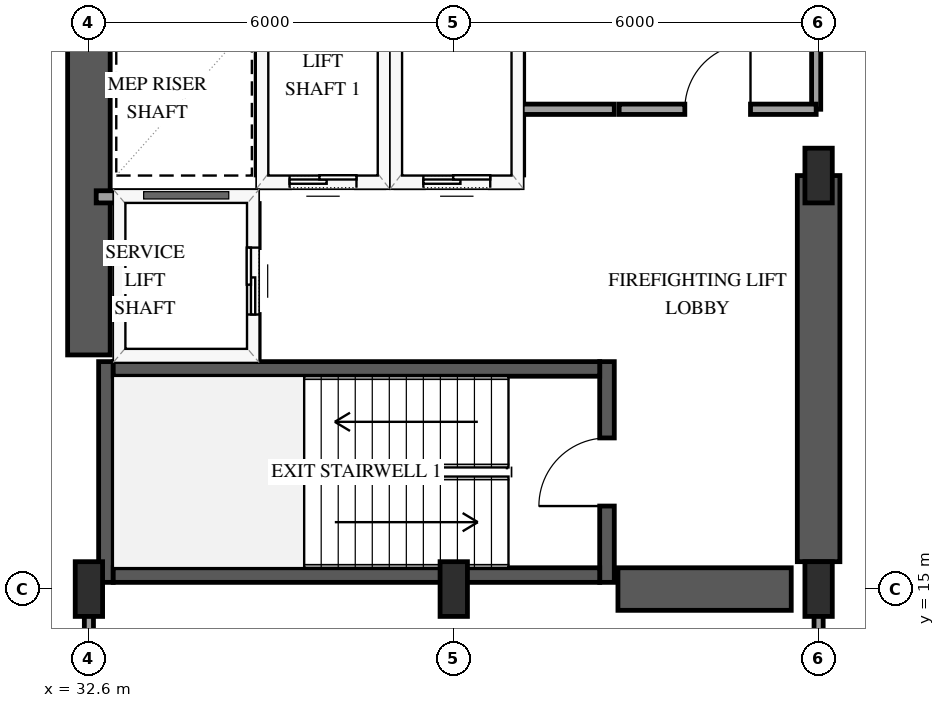
"""IFC4 building model, lengths in metres.
Left out: names, types, materials, properties, quantities, classifications, styles, units other than length and angle.
Written with IfcOpenShell. Run it as: python <this file> out.ifc"""

import sys

from ifc_helpers import new_model, si_unit, direction, frame, frame_2d, origin, origin_2d, place, context, subcontext, project, spatial, rectangle, extrude, element, fill, save


model = new_model("IFC4")
c1 = context("Model", 3, precision=1e-05, world=origin(), true_north=direction((0.0, 1.0)))
c2 = subcontext(c1, "Body", "Model", "MODEL_VIEW")
j1 = project(units=[si_unit("LENGTHUNIT", "METRE"), si_unit("PLANEANGLEUNIT", "RADIAN")], contexts=[c1])
p1 = place(None, origin())
s1 = spatial("IfcSite", under=j1, at=p1, CompositionType="ELEMENT")
p2 = place(p1, origin())
s2 = spatial("IfcBuilding", under=s1, at=p2, CompositionType="ELEMENT")
p3 = place(p2, frame((0.0, 0.0, 16.2)))
s3 = spatial("IfcBuildingStorey", under=s2, at=p3, CompositionType="ELEMENT", Elevation=16.2)
p4 = place(p3, frame((32.88, 15.11, 0.0), z_axis=(0.0, 0.0, 1.0), x_axis=(0.0, 1.0, 0.0)))
e1 = element("IfcWall", 1, at=p4, inside=s3, PredefinedType="SHEAR", context=c2, shape_type="SweptSolid", body=[
    extrude(rectangle(XDim=3.63, YDim=0.24, at=frame_2d((1.815, 0.0))), origin(), (0.0, 0.0, 1.0), 4.5),
])
p5 = place(p3, frame((41.12, 15.11, 0.0), z_axis=(0.0, 0.0, 1.0), x_axis=(0.0, 1.0, 0.0)))
e2 = element("IfcWall", 2, at=p5, inside=s3, PredefinedType="SHEAR", context=c2, shape_type="SweptSolid", body=[
    extrude(rectangle(XDim=3.63, YDim=0.24, at=frame_2d((1.815, 0.0))), origin(), (0.0, 0.0, 1.0), 4.5),
])
p6 = place(p5, frame((1.255, 0.0, 0.0)))
e3 = element("IfcOpeningElement", 3, at=p6, cuts=e2, PredefinedType="OPENING", context=c2, shape_type="SweptSolid", body=[
    extrude(rectangle(XDim=1.12, YDim=2.15, at=frame_2d((0.56, 1.075))), frame((0.0, 0.13, 0.0), z_axis=(0.0, -1.0, 0.0), x_axis=(1.0, 0.0, 0.0)), (0.0, 0.0, 1.0), 0.26),
])
for number, where, z_axis, x_axis in (
    (4, (33.0, 15.23, 0.0), (0.0, 0.0, 1.0), (1.0, 0.0, 0.0)),
    (5, (33.0, 18.62, 0.0), (0.0, 0.0, 1.0), (1.0, 0.0, 0.0)),
):
    element("IfcWall", number, at=place(p3, frame(where, z_axis=z_axis, x_axis=x_axis)), inside=s3, PredefinedType="SHEAR", context=c2, shape_type="SweptSolid", body=[
        extrude(rectangle(XDim=8.0, YDim=0.24, at=frame_2d((4.0, 0.0))), origin(), (0.0, 0.0, 1.0), 4.5),
    ])
p7 = place(p3, frame((32.6, 18.85, 0.0), z_axis=(0.0, 0.0, 1.0), x_axis=(0.0, 1.0, 0.0)))
e6 = element("IfcWall", 6, at=p7, inside=s3, PredefinedType="SHEAR", context=c2, shape_type="SweptSolid", body=[
    extrude(rectangle(XDim=12.3, YDim=0.7, at=frame_2d((6.15, 0.0))), origin(), (0.0, 0.0, 1.0), 4.5),
])
p8 = place(p3, frame((41.3, 15.0, 0.0), z_axis=(0.0, 0.0, 1.0), x_axis=(1.0, 0.0, 0.0)))
e7 = element("IfcWall", 7, at=p8, inside=s3, PredefinedType="SHEAR", context=c2, shape_type="SweptSolid", body=[
    extrude(rectangle(XDim=2.85, YDim=0.7, at=frame_2d((1.425, 0.0))), origin(), (0.0, 0.0, 1.0), 4.5),
])
p9 = place(p3, frame((44.6, 15.45, 0.0), z_axis=(0.0, 0.0, 1.0), x_axis=(0.0, 1.0, 0.0)))
e8 = element("IfcWall", 8, at=p9, inside=s3, PredefinedType="SHEAR", context=c2, shape_type="SweptSolid", body=[
    extrude(rectangle(XDim=6.35, YDim=0.7, at=frame_2d((3.175, 0.0))), origin(), (0.0, 0.0, 1.0), 4.5),
])
for number, where, z_axis, x_axis in (
    (9, (32.6, 15.0, 0.0), (0.0, 0.0, 1.0), (1.0, 0.0, 0.0)),
    (10, (38.6, 15.0, 0.0), (0.0, 0.0, 1.0), (1.0, 0.0, 0.0)),
    (11, (44.6, 15.0, 0.0), (0.0, 0.0, 1.0), (1.0, 0.0, 0.0)),
    (12, (44.6, 21.8, 0.0), (0.0, 0.0, 1.0), (1.0, 0.0, 0.0)),
):
    element("IfcColumn", number, at=place(p3, frame(where, z_axis=z_axis, x_axis=x_axis)), inside=s3, PredefinedType="PILASTER", context=c2, shape_type="SweptSolid", body=[
        extrude(rectangle(XDim=0.45, YDim=0.9, at=origin_2d()), origin(), (0.0, 0.0, 1.0), 4.5),
    ])
p10 = place(p3, frame((35.45, 21.7, 0.0), z_axis=(0.0, 0.0, 1.0), x_axis=(1.0, 0.0, 0.0)))
e13 = element("IfcWall", 13, at=p10, inside=s3, PredefinedType="SOLIDWALL", context=c2, shape_type="SweptSolid", body=[
    extrude(rectangle(XDim=2.0, YDim=0.2, at=frame_2d((1.0, 0.0))), origin(), (0.0, 0.0, 1.0), 4.18),
])
p11 = place(p10, frame((0.45, 0.0, 0.0)))
e14 = element("IfcOpeningElement", 14, at=p11, cuts=e13, PredefinedType="OPENING", context=c2, shape_type="SweptSolid", body=[
    extrude(rectangle(XDim=1.1, YDim=2.15, at=frame_2d((0.55, 1.075))), frame((0.0, 0.11, 0.0), z_axis=(0.0, -1.0, 0.0), x_axis=(1.0, 0.0, 0.0)), (0.0, 0.0, 1.0), 0.22),
])
for number, where, z_axis, x_axis in (
    (15, (35.45, 21.81, 0.0), (0.0, 0.0, 1.0), (0.0, 1.0, 0.0)),
    (16, (37.45, 21.81, 0.0), (0.0, 0.0, 1.0), (0.0, 1.0, 0.0)),
):
    element("IfcWall", number, at=place(p3, frame(where, z_axis=z_axis, x_axis=x_axis)), inside=s3, PredefinedType="SOLIDWALL", context=c2, shape_type="SweptSolid", body=[
        extrude(rectangle(XDim=2.38, YDim=0.2, at=frame_2d((1.19, 0.0))), origin(), (0.0, 0.0, 1.0), 4.18),
    ])
p12 = place(p3, frame((37.65, 21.7, 0.0), z_axis=(0.0, 0.0, 1.0), x_axis=(1.0, 0.0, 0.0)))
e17 = element("IfcWall", 17, at=p12, inside=s3, PredefinedType="SOLIDWALL", context=c2, shape_type="SweptSolid", body=[
    extrude(rectangle(XDim=2.0, YDim=0.2, at=frame_2d((1.0, 0.0))), origin(), (0.0, 0.0, 1.0), 4.18),
])
p13 = place(p12, frame((0.45, 0.0, 0.0)))
e18 = element("IfcOpeningElement", 18, at=p13, cuts=e17, PredefinedType="OPENING", context=c2, shape_type="SweptSolid", body=[
    extrude(rectangle(XDim=1.1, YDim=2.15, at=frame_2d((0.55, 1.075))), frame((0.0, 0.11, 0.0), z_axis=(0.0, -1.0, 0.0), x_axis=(1.0, 0.0, 0.0)), (0.0, 0.0, 1.0), 0.22),
])
p14 = place(p3, frame((39.65, 21.81, 0.0), z_axis=(0.0, 0.0, 1.0), x_axis=(0.0, 1.0, 0.0)))
e19 = element("IfcWall", 19, at=p14, inside=s3, PredefinedType="SOLIDWALL", context=c2, shape_type="SweptSolid", body=[
    extrude(rectangle(XDim=2.38, YDim=0.2, at=frame_2d((1.19, 0.0))), origin(), (0.0, 0.0, 1.0), 4.18),
])
p15 = place(p3, frame((32.72, 21.45, 0.0), z_axis=(0.0, 0.0, 1.0), x_axis=(1.0, 0.0, 0.0)))
e20 = element("IfcWall", 20, at=p15, inside=s3, PredefinedType="SOLIDWALL", context=c2, shape_type="SweptSolid", body=[
    extrude(rectangle(XDim=2.58, YDim=0.2, at=frame_2d((1.29, 0.0))), origin(), (0.0, 0.0, 1.0), 4.18),
])
p16 = place(p3, frame((35.3, 18.79, 0.0), z_axis=(0.0, 0.0, 1.0), x_axis=(0.0, 1.0, 0.0)))
e21 = element("IfcWall", 21, at=p16, inside=s3, PredefinedType="SOLIDWALL", context=c2, shape_type="SweptSolid", body=[
    extrude(rectangle(XDim=2.55, YDim=0.2, at=frame_2d((1.275, 0.0))), origin(), (0.0, 0.0, 1.0), 4.18),
])
p17 = place(p16, frame((0.725, 0.0, 0.0)))
e22 = element("IfcOpeningElement", 22, at=p17, cuts=e21, PredefinedType="OPENING", context=c2, shape_type="SweptSolid", body=[
    extrude(rectangle(XDim=1.1, YDim=2.15, at=frame_2d((0.55, 1.075))), frame((0.0, 0.11, 0.0), z_axis=(0.0, -1.0, 0.0), x_axis=(1.0, 0.0, 0.0)), (0.0, 0.0, 1.0), 0.22),
])
p18 = place(p3, frame((32.6, 14.93, 0.0), z_axis=(0.0, 0.0, 1.0), x_axis=(0.0, -1.0, 0.0)))
e23 = element("IfcWall", 23, at=p18, inside=s3, PredefinedType="PARTITIONING", context=c2, shape_type="SweptSolid", body=[
    extrude(rectangle(XDim=7.86, YDim=0.15, at=frame_2d((3.93, 0.0))), origin(), (0.0, 0.0, 1.0), 3.302),
])
p19 = place(p3, frame((44.56, 29.8, 0.0), z_axis=(0.0, 0.0, 1.0), x_axis=(0.0, -1.0, 0.0)))
e24 = element("IfcWall", 24, at=p19, inside=s3, PredefinedType="PARTITIONING", context=c2, shape_type="SweptSolid", body=[
    extrude(rectangle(XDim=6.91, YDim=0.15, at=frame_2d((3.455, 0.0))), origin(), (0.0, 0.0, 1.0), 3.22),
])
p20 = place(p19, frame((2.915, 0.0, 0.0)))
e25 = element("IfcOpeningElement", 25, at=p20, cuts=e24, PredefinedType="OPENING", context=c2, shape_type="SweptSolid", body=[
    extrude(rectangle(XDim=1.38, YDim=2.2, at=frame_2d((0.69, 1.1))), frame((0.0, 0.085, 0.0), z_axis=(0.0, -1.0, 0.0), x_axis=(1.0, 0.0, 0.0)), (0.0, 0.0, 1.0), 0.17),
])
p21 = place(p3, frame((41.32, 22.89, 0.0), z_axis=(0.0, 0.0, 1.0), x_axis=(1.0, 0.0, 0.0)))
e26 = element("IfcWall", 26, at=p21, inside=s3, PredefinedType="PARTITIONING", context=c2, shape_type="SweptSolid", body=[
    extrude(rectangle(XDim=3.24, YDim=0.17, at=frame_2d((1.62, 0.0))), origin(), (0.0, 0.0, 1.0), 4.18),
])
p22 = place(p21, frame((1.08, 0.0, 0.0)))
e27 = element("IfcOpeningElement", 27, at=p22, cuts=e26, PredefinedType="OPENING", context=c2, shape_type="SweptSolid", body=[
    extrude(rectangle(XDim=1.08, YDim=2.15, at=frame_2d((0.54, 1.075))), frame((0.0, 0.095, 0.0), z_axis=(0.0, -1.0, 0.0), x_axis=(1.0, 0.0, 0.0)), (0.0, 0.0, 1.0), 0.19),
])
p23 = place(p3, frame((44.6, 11.87, 0.0), z_axis=(0.0, 0.0, 1.0), x_axis=(0.0, 1.0, 0.0)))
e28 = element("IfcWall", 28, at=p23, inside=s3, PredefinedType="PARTITIONING", context=c2, shape_type="SweptSolid", body=[
    extrude(rectangle(XDim=3.06, YDim=0.15, at=frame_2d((1.53, 0.0))), origin(), (0.0, 0.0, 1.0), 3.302),
])
p24 = place(p3, frame((39.72, 22.89, 0.0), z_axis=(0.0, 0.0, 1.0), x_axis=(1.0, 0.0, 0.0)))
e29 = element("IfcWall", 29, at=p24, inside=s3, PredefinedType="PARTITIONING", context=c2, shape_type="SweptSolid", body=[
    extrude(rectangle(XDim=1.52, YDim=0.17, at=frame_2d((0.76, 0.0))), origin(), (0.0, 0.0, 1.0), 4.18),
])
p25 = place(p11, origin())
e30 = element("IfcDoor", 30, at=p25, inside=s3, OperationType="SLIDING_TO_LEFT", PredefinedType="DOOR", context=c2, shape_type="SweptSolid", body=[
    extrude(rectangle(XDim=1.1, YDim=2.15, at=frame_2d((0.55, 1.075))), frame((0.0, 0.025, 0.0), z_axis=(0.0, -1.0, 0.0), x_axis=(1.0, 0.0, 0.0)), (0.0, 0.0, 1.0), 0.05),
])
fill(e14, e30)
p26 = place(p13, origin())
e31 = element("IfcDoor", 31, at=p26, inside=s3, OperationType="SLIDING_TO_LEFT", PredefinedType="DOOR", context=c2, shape_type="SweptSolid", body=[
    extrude(rectangle(XDim=1.1, YDim=2.15, at=frame_2d((0.55, 1.075))), frame((0.0, 0.025, 0.0), z_axis=(0.0, -1.0, 0.0), x_axis=(1.0, 0.0, 0.0)), (0.0, 0.0, 1.0), 0.05),
])
fill(e18, e31)
p27 = place(p17, origin())
e32 = element("IfcDoor", 32, at=p27, inside=s3, OperationType="SLIDING_TO_LEFT", PredefinedType="DOOR", context=c2, shape_type="SweptSolid", body=[
    extrude(rectangle(XDim=1.1, YDim=2.15, at=frame_2d((0.55, 1.075))), frame((0.0, 0.025, 0.0), z_axis=(0.0, -1.0, 0.0), x_axis=(1.0, 0.0, 0.0)), (0.0, 0.0, 1.0), 0.05),
])
fill(e22, e32)
p28 = place(p6, origin())
e33 = element("IfcDoor", 33, at=p28, inside=s3, OperationType="SINGLE_SWING_LEFT", PredefinedType="DOOR", context=c2, shape_type="SweptSolid", body=[
    extrude(rectangle(XDim=1.12, YDim=2.15, at=frame_2d((0.56, 1.075))), frame((0.0, 0.025, 0.0), z_axis=(0.0, -1.0, 0.0), x_axis=(1.0, 0.0, 0.0)), (0.0, 0.0, 1.0), 0.05),
])
fill(e3, e33)
p29 = place(p22, origin())
e34 = element("IfcDoor", 34, at=p29, inside=s3, OperationType="SINGLE_SWING_RIGHT", PredefinedType="DOOR", context=c2, shape_type="SweptSolid", body=[
    extrude(rectangle(XDim=1.08, YDim=2.15, at=frame_2d((0.54, 1.075))), frame((0.0, 0.025, 0.0), z_axis=(0.0, -1.0, 0.0), x_axis=(1.0, 0.0, 0.0)), (0.0, 0.0, 1.0), 0.05),
])
fill(e27, e34)
save(model, sys.argv[1])
